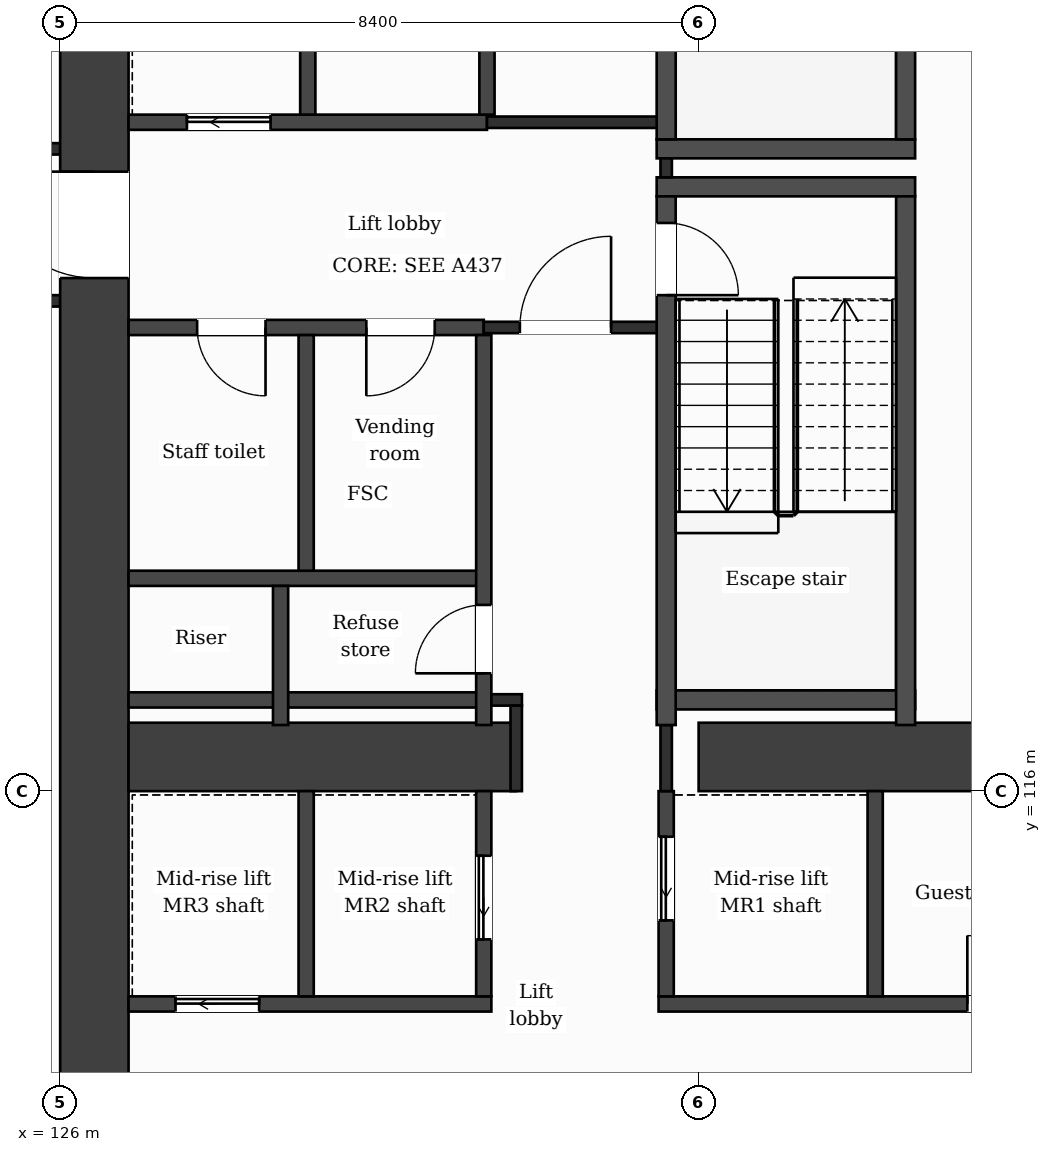
"""IFC4 building model, lengths in metres.
Left out: names, types, materials, properties, quantities, classifications, styles, units other than length and angle.
Written with IfcOpenShell. Run it as: python <this file> out.ifc"""

import sys

from ifc_helpers import new_model, si_unit, direction, frame, frame_2d, origin, place, context, subcontext, project, spatial, rectangle, extrude, element, fill, save


model = new_model("IFC4")
c1 = context("Model", 3, precision=1e-05, world=origin(), true_north=direction((0.0, 1.0)))
c2 = subcontext(c1, "Body", "Model", "MODEL_VIEW")
j1 = project(units=[si_unit("LENGTHUNIT", "METRE"), si_unit("PLANEANGLEUNIT", "RADIAN")], contexts=[c1])
p1 = place(None, origin())
s1 = spatial("IfcSite", under=j1, at=p1, CompositionType="ELEMENT")
p2 = place(p1, origin())
s2 = spatial("IfcBuilding", under=s1, at=p2, CompositionType="ELEMENT")
p3 = place(p2, frame((0.0, 0.0, 155.2)))
s3 = spatial("IfcBuildingStorey", under=s2, at=p3, CompositionType="ELEMENT", Elevation=155.2)
p4 = place(p3, frame((137.776, 131.95, 0.0), z_axis=(0.0, 0.0, 1.0), x_axis=(0.133421759112, -0.991059349482, 0.0)))
e1 = element("IfcWall", 1, at=p4, inside=s3, PredefinedType="SHEAR", context=c2, shape_type="SweptSolid", body=[
    extrude(rectangle(XDim=21.29, YDim=0.9, at=frame_2d((10.645, 0.0))), origin(), (0.0, 0.0, 1.0), 3.7),
])
p5 = place(p3, frame((126.45, 110.85, 0.0), z_axis=(0.0, 0.0, 1.0), x_axis=(0.0, 1.0, 0.0)))
e2 = element("IfcWall", 2, at=p5, inside=s3, PredefinedType="SHEAR", context=c2, shape_type="SweptSolid", body=[
    extrude(rectangle(XDim=21.1, YDim=0.9, at=frame_2d((10.55, 0.0))), origin(), (0.0, 0.0, 1.0), 3.7),
])
p6 = place(p5, frame((11.9, 0.0, 0.0)))
e3 = element("IfcOpeningElement", 3, at=p6, cuts=e2, PredefinedType="OPENING", context=c2, shape_type="SweptSolid", body=[
    extrude(rectangle(XDim=1.4, YDim=2.1, at=frame_2d((0.7, 1.05))), frame((0.0, 0.46, 0.0), z_axis=(0.0, -1.0, 0.0), x_axis=(1.0, 0.0, 0.0)), (0.0, 0.0, 1.0), 0.92),
])
p7 = place(p3, frame((126.9, 116.45, 0.0), z_axis=(0.0, 0.0, 1.0), x_axis=(1.0, 0.0, 0.0)))
e4 = element("IfcWall", 4, at=p7, inside=s3, PredefinedType="SHEAR", context=c2, shape_type="SweptSolid", body=[
    extrude(rectangle(XDim=5.1, YDim=0.9, at=frame_2d((2.55, 0.0))), origin(), (0.0, 0.0, 1.0), 3.7),
])
p8 = place(p3, frame((134.4, 116.45, 0.0), z_axis=(0.0, 0.0, 1.0), x_axis=(1.0, 0.0, 0.0)))
e5 = element("IfcWall", 5, at=p8, inside=s3, PredefinedType="SHEAR", context=c2, shape_type="SweptSolid", body=[
    extrude(rectangle(XDim=5.077, YDim=0.9, at=frame_2d((2.539, 0.0))), origin(), (0.0, 0.0, 1.0), 3.7),
])
p9 = place(p3, frame((126.9, 113.2, 0.0), z_axis=(0.0, 0.0, 1.0), x_axis=(1.0, 0.0, 0.0)))
e6 = element("IfcWall", 6, at=p9, inside=s3, PredefinedType="PARTITIONING", context=c2, shape_type="SweptSolid", body=[
    extrude(rectangle(XDim=4.773, YDim=0.2, at=frame_2d((2.387, 0.0))), origin(), (0.0, 0.0, 1.0), 3.38),
])
p10 = place(p9, frame((0.618, 0.0, 0.0)))
e7 = element("IfcOpeningElement", 7, at=p10, cuts=e6, PredefinedType="OPENING", context=c2, shape_type="SweptSolid", body=[
    extrude(rectangle(XDim=1.1, YDim=2.1, at=frame_2d((0.55, 1.05))), frame((0.0, 0.11, 0.0), z_axis=(0.0, -1.0, 0.0), x_axis=(1.0, 0.0, 0.0)), (0.0, 0.0, 1.0), 0.22),
])
p11 = place(p3, frame((133.873, 113.2, 0.0), z_axis=(0.0, 0.0, 1.0), x_axis=(1.0, 0.0, 0.0)))
e8 = element("IfcWall", 8, at=p11, inside=s3, PredefinedType="PARTITIONING", context=c2, shape_type="SweptSolid", body=[
    extrude(rectangle(XDim=6.003, YDim=0.2, at=frame_2d((3.001, 0.0))), origin(), (0.0, 0.0, 1.0), 3.38),
])
p12 = place(p11, frame((4.062, 0.0, 0.0)))
e9 = element("IfcOpeningElement", 9, at=p12, cuts=e8, PredefinedType="OPENING", context=c2, shape_type="SweptSolid", body=[
    extrude(rectangle(XDim=0.9, YDim=2.1, at=frame_2d((0.45, 1.05))), frame((0.0, 0.11, 0.0), z_axis=(0.0, -1.0, 0.0), x_axis=(1.0, 0.0, 0.0)), (0.0, 0.0, 1.0), 0.22),
])
p13 = place(p3, frame((126.9, 117.2, 0.0), z_axis=(0.0, 0.0, 1.0), x_axis=(1.0, 0.0, 0.0)))
e10 = element("IfcWall", 10, at=p13, inside=s3, PredefinedType="PARTITIONING", context=c2, shape_type="SweptSolid", body=[
    extrude(rectangle(XDim=4.673, YDim=0.2, at=frame_2d((2.336, 0.0))), origin(), (0.0, 0.0, 1.0), 3.38),
])
p14 = place(p3, frame((131.573, 117.2, 0.0), z_axis=(0.0, 0.0, 1.0), x_axis=(1.0, 0.0, 0.0)))
e11 = element("IfcWall", 11, at=p14, inside=s3, PredefinedType="PARTITIONING", context=c2, shape_type="SweptSolid", body=[
    extrude(rectangle(XDim=0.502, YDim=0.15, at=frame_2d((0.251, 0.0))), origin(), (0.0, 0.0, 1.0), 3.38),
])
p15 = place(p3, frame((133.848, 117.2, 0.0), z_axis=(0.0, 0.0, 1.0), x_axis=(1.0, 0.0, 0.0)))
e12 = element("IfcWall", 12, at=p15, inside=s3, PredefinedType="PARTITIONING", context=c2, shape_type="SweptSolid", body=[
    extrude(rectangle(XDim=3.4, YDim=0.25, at=frame_2d((1.7, 0.0))), origin(), (0.0, 0.0, 1.0), 3.38),
])
p16 = place(p3, frame((126.9, 118.8, 0.0), z_axis=(0.0, 0.0, 1.0), x_axis=(1.0, 0.0, 0.0)))
e13 = element("IfcWall", 13, at=p16, inside=s3, PredefinedType="PARTITIONING", context=c2, shape_type="SweptSolid", body=[
    extrude(rectangle(XDim=4.673, YDim=0.2, at=frame_2d((2.336, 0.0))), origin(), (0.0, 0.0, 1.0), 3.38),
])
p17 = place(p3, frame((126.9, 122.1, 0.0), z_axis=(0.0, 0.0, 1.0), x_axis=(1.0, 0.0, 0.0)))
e14 = element("IfcWall", 14, at=p17, inside=s3, PredefinedType="PARTITIONING", context=c2, shape_type="SweptSolid", body=[
    extrude(rectangle(XDim=4.673, YDim=0.2, at=frame_2d((2.336, 0.0))), origin(), (0.0, 0.0, 1.0), 3.38),
])
p18 = place(p17, frame((3.128, 0.0, 0.0)))
e15 = element("IfcOpeningElement", 15, at=p18, cuts=e14, PredefinedType="OPENING", context=c2, shape_type="SweptSolid", body=[
    extrude(rectangle(XDim=0.9, YDim=2.1, at=frame_2d((0.45, 1.05))), frame((0.0, 0.11, 0.0), z_axis=(0.0, -1.0, 0.0), x_axis=(1.0, 0.0, 0.0)), (0.0, 0.0, 1.0), 0.22),
])
p19 = place(p17, frame((0.902, 0.0, 0.0)))
e16 = element("IfcOpeningElement", 16, at=p19, cuts=e14, PredefinedType="OPENING", context=c2, shape_type="SweptSolid", body=[
    extrude(rectangle(XDim=0.9, YDim=2.1, at=frame_2d((0.45, 1.05))), frame((0.0, 0.11, 0.0), z_axis=(0.0, -1.0, 0.0), x_axis=(1.0, 0.0, 0.0)), (0.0, 0.0, 1.0), 0.22),
])
p20 = place(p3, frame((131.573, 122.1, 0.0), z_axis=(0.0, 0.0, 1.0), x_axis=(1.0, 0.0, 0.0)))
e17 = element("IfcWall", 17, at=p20, inside=s3, PredefinedType="PARTITIONING", context=c2, shape_type="SweptSolid", body=[
    extrude(rectangle(XDim=2.4, YDim=0.15, at=frame_2d((1.2, 0.0))), origin(), (0.0, 0.0, 1.0), 3.38),
])
p21 = place(p20, frame((0.475, 0.0, 0.0)))
e18 = element("IfcOpeningElement", 18, at=p21, cuts=e17, PredefinedType="OPENING", context=c2, shape_type="SweptSolid", body=[
    extrude(rectangle(XDim=1.2, YDim=2.1, at=frame_2d((0.6, 1.05))), frame((0.0, 0.085, 0.0), z_axis=(0.0, -1.0, 0.0), x_axis=(1.0, 0.0, 0.0)), (0.0, 0.0, 1.0), 0.17),
])
p22 = place(p3, frame((100.8, 122.45, 0.0), z_axis=(0.0, 0.0, 1.0), x_axis=(1.0, 0.0, 0.0)))
e19 = element("IfcWall", 19, at=p22, inside=s3, PredefinedType="PARTITIONING", context=c2, shape_type="SweptSolid", body=[
    extrude(rectangle(XDim=25.2, YDim=0.15, at=frame_2d((12.6, 0.0))), origin(), (0.0, 0.0, 1.0), 3.38),
])
for number, where, z_axis, x_axis in (
    (20, (133.848, 123.95, 0.0), (0.0, 0.0, 1.0), (1.0, 0.0, 0.0)),
    (21, (133.848, 124.45, 0.0), (0.0, 0.0, 1.0), (1.0, 0.0, 0.0)),
):
    element("IfcWall", number, at=place(p3, frame(where, z_axis=z_axis, x_axis=x_axis)), inside=s3, PredefinedType="PARTITIONING", context=c2, shape_type="SweptSolid", body=[
        extrude(rectangle(XDim=3.4, YDim=0.25, at=frame_2d((1.7, 0.0))), origin(), (0.0, 0.0, 1.0), 3.38),
    ])
p23 = place(p3, frame((100.8, 124.45, 0.0), z_axis=(0.0, 0.0, 1.0), x_axis=(1.0, 0.0, 0.0)))
e22 = element("IfcWall", 22, at=p23, inside=s3, PredefinedType="PARTITIONING", context=c2, shape_type="SweptSolid", body=[
    extrude(rectangle(XDim=25.2, YDim=0.15, at=frame_2d((12.6, 0.0))), origin(), (0.0, 0.0, 1.0), 3.38),
])
p24 = place(p23, frame((3.03, 0.0, 0.0)))
e23 = element("IfcOpeningElement", 23, at=p24, cuts=e22, PredefinedType="OPENING", context=c2, shape_type="SweptSolid", body=[
    extrude(rectangle(XDim=1.0, YDim=2.1, at=frame_2d((0.5, 1.05))), frame((0.0, 0.085, 0.0), z_axis=(0.0, -1.0, 0.0), x_axis=(1.0, 0.0, 0.0)), (0.0, 0.0, 1.0), 0.17),
])
p25 = place(p23, frame((12.77, 0.0, 0.0)))
e24 = element("IfcOpeningElement", 24, at=p25, cuts=e22, PredefinedType="OPENING", context=c2, shape_type="SweptSolid", body=[
    extrude(rectangle(XDim=1.0, YDim=2.1, at=frame_2d((0.5, 1.05))), frame((0.0, 0.085, 0.0), z_axis=(0.0, -1.0, 0.0), x_axis=(1.0, 0.0, 0.0)), (0.0, 0.0, 1.0), 0.17),
])
p26 = place(p23, frame((17.67, 0.0, 0.0)))
e25 = element("IfcOpeningElement", 25, at=p26, cuts=e22, PredefinedType="OPENING", context=c2, shape_type="SweptSolid", body=[
    extrude(rectangle(XDim=1.0, YDim=2.1, at=frame_2d((0.5, 1.05))), frame((0.0, 0.085, 0.0), z_axis=(0.0, -1.0, 0.0), x_axis=(1.0, 0.0, 0.0)), (0.0, 0.0, 1.0), 0.17),
])
p27 = place(p23, frame((22.35, 0.0, 0.0)))
e26 = element("IfcOpeningElement", 26, at=p27, cuts=e22, PredefinedType="OPENING", context=c2, shape_type="SweptSolid", body=[
    extrude(rectangle(XDim=1.0, YDim=2.1, at=frame_2d((0.5, 1.05))), frame((0.0, 0.085, 0.0), z_axis=(0.0, -1.0, 0.0), x_axis=(1.0, 0.0, 0.0)), (0.0, 0.0, 1.0), 0.17),
])
p28 = place(p3, frame((126.9, 124.8, 0.0), z_axis=(0.0, 0.0, 1.0), x_axis=(1.0, 0.0, 0.0)))
e27 = element("IfcWall", 27, at=p28, inside=s3, PredefinedType="PARTITIONING", context=c2, shape_type="SweptSolid", body=[
    extrude(rectangle(XDim=4.715, YDim=0.2, at=frame_2d((2.358, 0.0))), origin(), (0.0, 0.0, 1.0), 3.38),
])
p29 = place(p28, frame((0.768, 0.0, 0.0)))
e28 = element("IfcOpeningElement", 28, at=p29, cuts=e27, PredefinedType="OPENING", context=c2, shape_type="SweptSolid", body=[
    extrude(rectangle(XDim=1.1, YDim=2.1, at=frame_2d((0.55, 1.05))), frame((0.0, 0.11, 0.0), z_axis=(0.0, -1.0, 0.0), x_axis=(1.0, 0.0, 0.0)), (0.0, 0.0, 1.0), 0.22),
])
p30 = place(p3, frame((131.615, 124.8, 0.0), z_axis=(0.0, 0.0, 1.0), x_axis=(1.0, 0.0, 0.0)))
e29 = element("IfcWall", 29, at=p30, inside=s3, PredefinedType="PARTITIONING", context=c2, shape_type="SweptSolid", body=[
    extrude(rectangle(XDim=2.483, YDim=0.15, at=frame_2d((1.241, 0.0))), origin(), (0.0, 0.0, 1.0), 3.38),
])
p31 = place(p3, frame((128.9, 116.87, 0.0), z_axis=(0.0, 0.0, 1.0), x_axis=(0.0, 1.0, 0.0)))
e30 = element("IfcWall", 30, at=p31, inside=s3, PredefinedType="PARTITIONING", context=c2, shape_type="SweptSolid", body=[
    extrude(rectangle(XDim=1.83, YDim=0.2, at=frame_2d((0.915, 0.0))), origin(), (0.0, 0.0, 1.0), 3.38),
])
p32 = place(p3, frame((129.237, 113.3, 0.0), z_axis=(0.0, 0.0, 1.0), x_axis=(0.0, 1.0, 0.0)))
e31 = element("IfcWall", 31, at=p32, inside=s3, PredefinedType="PARTITIONING", context=c2, shape_type="SweptSolid", body=[
    extrude(rectangle(XDim=2.7, YDim=0.2, at=frame_2d((1.35, 0.0))), origin(), (0.0, 0.0, 1.0), 3.38),
])
for number, where, z_axis, x_axis in (
    (32, (129.237, 118.9, 0.0), (0.0, 0.0, 1.0), (0.0, 1.0, 0.0)),
    (33, (129.258, 124.9, 0.0), (0.0, 0.0, 1.0), (0.0, 1.0, 0.0)),
):
    element("IfcWall", number, at=place(p3, frame(where, z_axis=z_axis, x_axis=x_axis)), inside=s3, PredefinedType="PARTITIONING", context=c2, shape_type="SweptSolid", body=[
        extrude(rectangle(XDim=3.1, YDim=0.2, at=frame_2d((1.55, 0.0))), origin(), (0.0, 0.0, 1.0), 3.38),
    ])
p33 = place(p3, frame((131.573, 113.3, 0.0), z_axis=(0.0, 0.0, 1.0), x_axis=(0.0, 1.0, 0.0)))
e34 = element("IfcWall", 34, at=p33, inside=s3, PredefinedType="PARTITIONING", context=c2, shape_type="SweptSolid", body=[
    extrude(rectangle(XDim=2.7, YDim=0.2, at=frame_2d((1.35, 0.0))), origin(), (0.0, 0.0, 1.0), 3.38),
])
p34 = place(p33, frame((0.75, 0.0, 0.0)))
e35 = element("IfcOpeningElement", 35, at=p34, cuts=e34, PredefinedType="OPENING", context=c2, shape_type="SweptSolid", body=[
    extrude(rectangle(XDim=1.1, YDim=2.1, at=frame_2d((0.55, 1.05))), frame((0.0, 0.11, 0.0), z_axis=(0.0, -1.0, 0.0), x_axis=(1.0, 0.0, 0.0)), (0.0, 0.0, 1.0), 0.22),
])
p35 = place(p3, frame((131.573, 116.87, 0.0), z_axis=(0.0, 0.0, 1.0), x_axis=(0.0, 1.0, 0.0)))
e36 = element("IfcWall", 36, at=p35, inside=s3, PredefinedType="PARTITIONING", context=c2, shape_type="SweptSolid", body=[
    extrude(rectangle(XDim=5.13, YDim=0.2, at=frame_2d((2.565, 0.0))), origin(), (0.0, 0.0, 1.0), 3.38),
])
p36 = place(p35, frame((0.68, 0.0, 0.0)))
e37 = element("IfcOpeningElement", 37, at=p36, cuts=e36, PredefinedType="OPENING", context=c2, shape_type="SweptSolid", body=[
    extrude(rectangle(XDim=0.9, YDim=2.1, at=frame_2d((0.45, 1.05))), frame((0.0, 0.11, 0.0), z_axis=(0.0, -1.0, 0.0), x_axis=(1.0, 0.0, 0.0)), (0.0, 0.0, 1.0), 0.22),
])
p37 = place(p3, frame((131.615, 124.9, 0.0), z_axis=(0.0, 0.0, 1.0), x_axis=(0.0, 1.0, 0.0)))
e38 = element("IfcWall", 38, at=p37, inside=s3, PredefinedType="PARTITIONING", context=c2, shape_type="SweptSolid", body=[
    extrude(rectangle(XDim=3.1, YDim=0.2, at=frame_2d((1.55, 0.0))), origin(), (0.0, 0.0, 1.0), 3.38),
])
p38 = place(p3, frame((132.0, 116.0, 0.0), z_axis=(0.0, 0.0, 1.0), x_axis=(0.0, 1.0, 0.0)))
e39 = element("IfcWall", 39, at=p38, inside=s3, PredefinedType="PARTITIONING", context=c2, shape_type="SweptSolid", body=[
    extrude(rectangle(XDim=1.125, YDim=0.15, at=frame_2d((0.562, 0.0))), origin(), (0.0, 0.0, 1.0), 3.38),
])
p39 = place(p3, frame((133.973, 113.3, 0.0), z_axis=(0.0, 0.0, 1.0), x_axis=(0.0, 1.0, 0.0)))
e40 = element("IfcWall", 40, at=p39, inside=s3, PredefinedType="PARTITIONING", context=c2, shape_type="SweptSolid", body=[
    extrude(rectangle(XDim=2.7, YDim=0.2, at=frame_2d((1.35, 0.0))), origin(), (0.0, 0.0, 1.0), 3.38),
])
p40 = place(p39, frame((1.0, 0.0, 0.0)))
e41 = element("IfcOpeningElement", 41, at=p40, cuts=e40, PredefinedType="OPENING", context=c2, shape_type="SweptSolid", body=[
    extrude(rectangle(XDim=1.1, YDim=2.1, at=frame_2d((0.55, 1.05))), frame((0.0, 0.11, 0.0), z_axis=(0.0, -1.0, 0.0), x_axis=(1.0, 0.0, 0.0)), (0.0, 0.0, 1.0), 0.22),
])
p41 = place(p3, frame((133.973, 116.0, 0.0), z_axis=(0.0, 0.0, 1.0), x_axis=(0.0, 1.0, 0.0)))
e42 = element("IfcWall", 42, at=p41, inside=s3, PredefinedType="PARTITIONING", context=c2, shape_type="SweptSolid", body=[
    extrude(rectangle(XDim=0.87, YDim=0.15, at=frame_2d((0.435, 0.0))), origin(), (0.0, 0.0, 1.0), 3.38),
])
p42 = place(p3, frame((133.973, 124.075, 0.0), z_axis=(0.0, 0.0, 1.0), x_axis=(0.0, 1.0, 0.0)))
e43 = element("IfcWall", 43, at=p42, inside=s3, PredefinedType="PARTITIONING", context=c2, shape_type="SweptSolid", body=[
    extrude(rectangle(XDim=0.25, YDim=0.15, at=frame_2d((0.125, 0.0))), origin(), (0.0, 0.0, 1.0), 3.38),
])
p43 = place(p3, frame((133.973, 116.87, 0.0), z_axis=(0.0, 0.0, 1.0), x_axis=(0.0, 1.0, 0.0)))
e44 = element("IfcWall", 44, at=p43, inside=s3, PredefinedType="PARTITIONING", context=c2, shape_type="SweptSolid", body=[
    extrude(rectangle(XDim=6.955, YDim=0.25, at=frame_2d((3.478, 0.0))), origin(), (0.0, 0.0, 1.0), 3.38),
])
p44 = place(p43, frame((5.655, 0.0, 0.0)))
e45 = element("IfcOpeningElement", 45, at=p44, cuts=e44, PredefinedType="OPENING", context=c2, shape_type="SweptSolid", body=[
    extrude(rectangle(XDim=0.95, YDim=2.1, at=frame_2d((0.475, 1.05))), frame((0.0, 0.135, 0.0), z_axis=(0.0, -1.0, 0.0), x_axis=(1.0, 0.0, 0.0)), (0.0, 0.0, 1.0), 0.27),
])
p45 = place(p3, frame((133.973, 124.575, 0.0), z_axis=(0.0, 0.0, 1.0), x_axis=(0.0, 1.0, 0.0)))
e46 = element("IfcWall", 46, at=p45, inside=s3, PredefinedType="PARTITIONING", context=c2, shape_type="SweptSolid", body=[
    extrude(rectangle(XDim=6.955, YDim=0.25, at=frame_2d((3.478, 0.0))), origin(), (0.0, 0.0, 1.0), 3.38),
])
p46 = place(p45, frame((5.325, 0.0, 0.0)))
e47 = element("IfcOpeningElement", 47, at=p46, cuts=e46, PredefinedType="OPENING", context=c2, shape_type="SweptSolid", body=[
    extrude(rectangle(XDim=1.0, YDim=2.1, at=frame_2d((0.5, 1.05))), frame((0.0, 0.135, 0.0), z_axis=(0.0, -1.0, 0.0), x_axis=(1.0, 0.0, 0.0)), (0.0, 0.0, 1.0), 0.27),
])
p47 = place(p3, frame((136.722, 113.3, 0.0), z_axis=(0.0, 0.0, 1.0), x_axis=(0.0, 1.0, 0.0)))
e48 = element("IfcWall", 48, at=p47, inside=s3, PredefinedType="PARTITIONING", context=c2, shape_type="SweptSolid", body=[
    extrude(rectangle(XDim=2.7, YDim=0.2, at=frame_2d((1.35, 0.0))), origin(), (0.0, 0.0, 1.0), 3.38),
])
p48 = place(p3, frame((137.123, 116.87, 0.0), z_axis=(0.0, 0.0, 1.0), x_axis=(0.0, 1.0, 0.0)))
e49 = element("IfcWall", 49, at=p48, inside=s3, PredefinedType="PARTITIONING", context=c2, shape_type="SweptSolid", body=[
    extrude(rectangle(XDim=6.955, YDim=0.25, at=frame_2d((3.478, 0.0))), origin(), (0.0, 0.0, 1.0), 3.38),
])
p49 = place(p3, frame((137.123, 124.575, 0.0), z_axis=(0.0, 0.0, 1.0), x_axis=(0.0, 1.0, 0.0)))
e50 = element("IfcWall", 50, at=p49, inside=s3, PredefinedType="PARTITIONING", context=c2, shape_type="SweptSolid", body=[
    extrude(rectangle(XDim=6.955, YDim=0.25, at=frame_2d((3.478, 0.0))), origin(), (0.0, 0.0, 1.0), 3.38),
])
p50 = place(p21, origin())
e51 = element("IfcDoor", 51, at=p50, inside=s3, OperationType="SINGLE_SWING_RIGHT", PredefinedType="DOOR", context=c2, shape_type="SweptSolid", body=[
    extrude(rectangle(XDim=1.2, YDim=2.1, at=frame_2d((0.6, 1.05))), frame((0.0, 0.025, 0.0), z_axis=(0.0, -1.0, 0.0), x_axis=(1.0, 0.0, 0.0)), (0.0, 0.0, 1.0), 0.05),
])
fill(e18, e51)
p51 = place(p29, origin())
e52 = element("IfcDoor", 52, at=p51, inside=s3, OperationType="SLIDING_TO_LEFT", PredefinedType="DOOR", context=c2, shape_type="SweptSolid", body=[
    extrude(rectangle(XDim=1.1, YDim=2.1, at=frame_2d((0.55, 1.05))), frame((0.0, 0.025, 0.0), z_axis=(0.0, -1.0, 0.0), x_axis=(1.0, 0.0, 0.0)), (0.0, 0.0, 1.0), 0.05),
])
fill(e28, e52)
p52 = place(p18, origin())
e53 = element("IfcDoor", 53, at=p52, inside=s3, OperationType="SINGLE_SWING_LEFT", PredefinedType="DOOR", context=c2, shape_type="SweptSolid", body=[
    extrude(rectangle(XDim=0.9, YDim=2.1, at=frame_2d((0.45, 1.05))), frame((0.0, 0.025, 0.0), z_axis=(0.0, -1.0, 0.0), x_axis=(1.0, 0.0, 0.0)), (0.0, 0.0, 1.0), 0.05),
])
fill(e15, e53)
p53 = place(p19, origin())
e54 = element("IfcDoor", 54, at=p53, inside=s3, OperationType="SINGLE_SWING_RIGHT", PredefinedType="DOOR", context=c2, shape_type="SweptSolid", body=[
    extrude(rectangle(XDim=0.9, YDim=2.1, at=frame_2d((0.45, 1.05))), frame((0.0, 0.025, 0.0), z_axis=(0.0, -1.0, 0.0), x_axis=(1.0, 0.0, 0.0)), (0.0, 0.0, 1.0), 0.05),
])
fill(e16, e54)
p54 = place(p44, origin())
e55 = element("IfcDoor", 55, at=p54, inside=s3, OperationType="SINGLE_SWING_LEFT", PredefinedType="DOOR", context=c2, shape_type="SweptSolid", body=[
    extrude(rectangle(XDim=0.95, YDim=2.1, at=frame_2d((0.475, 1.05))), frame((0.0, 0.025, 0.0), z_axis=(0.0, -1.0, 0.0), x_axis=(1.0, 0.0, 0.0)), (0.0, 0.0, 1.0), 0.05),
])
fill(e45, e55)
p55 = place(p36, origin())
e56 = element("IfcDoor", 56, at=p55, inside=s3, OperationType="SINGLE_SWING_LEFT", PredefinedType="DOOR", context=c2, shape_type="SweptSolid", body=[
    extrude(rectangle(XDim=0.9, YDim=2.1, at=frame_2d((0.45, 1.05))), frame((0.0, 0.025, 0.0), z_axis=(0.0, -1.0, 0.0), x_axis=(1.0, 0.0, 0.0)), (0.0, 0.0, 1.0), 0.05),
])
fill(e37, e56)
p56 = place(p40, origin())
e57 = element("IfcDoor", 57, at=p56, inside=s3, OperationType="SLIDING_TO_LEFT", PredefinedType="DOOR", context=c2, shape_type="SweptSolid", body=[
    extrude(rectangle(XDim=1.1, YDim=2.1, at=frame_2d((0.55, 1.05))), frame((0.0, 0.025, 0.0), z_axis=(0.0, -1.0, 0.0), x_axis=(1.0, 0.0, 0.0)), (0.0, 0.0, 1.0), 0.05),
])
fill(e41, e57)
p57 = place(p34, origin())
e58 = element("IfcDoor", 58, at=p57, inside=s3, OperationType="SLIDING_TO_LEFT", PredefinedType="DOOR", context=c2, shape_type="SweptSolid", body=[
    extrude(rectangle(XDim=1.1, YDim=2.1, at=frame_2d((0.55, 1.05))), frame((0.0, 0.025, 0.0), z_axis=(0.0, -1.0, 0.0), x_axis=(1.0, 0.0, 0.0)), (0.0, 0.0, 1.0), 0.05),
])
fill(e35, e58)
p58 = place(p10, origin())
e59 = element("IfcDoor", 59, at=p58, inside=s3, OperationType="SLIDING_TO_LEFT", PredefinedType="DOOR", context=c2, shape_type="SweptSolid", body=[
    extrude(rectangle(XDim=1.1, YDim=2.1, at=frame_2d((0.55, 1.05))), frame((0.0, 0.025, 0.0), z_axis=(0.0, -1.0, 0.0), x_axis=(1.0, 0.0, 0.0)), (0.0, 0.0, 1.0), 0.05),
])
fill(e7, e59)
p59 = place(p12, origin())
e60 = element("IfcDoor", 60, at=p59, inside=s3, OperationType="SINGLE_SWING_LEFT", PredefinedType="DOOR", context=c2, shape_type="SweptSolid", body=[
    extrude(rectangle(XDim=0.9, YDim=2.1, at=frame_2d((0.45, 1.05))), frame((0.0, 0.025, 0.0), z_axis=(0.0, -1.0, 0.0), x_axis=(1.0, 0.0, 0.0)), (0.0, 0.0, 1.0), 0.05),
])
fill(e9, e60)
p60 = place(p6, origin())
e61 = element("IfcDoor", 61, at=p60, inside=s3, OperationType="SINGLE_SWING_RIGHT", PredefinedType="DOOR", context=c2, shape_type="SweptSolid", body=[
    extrude(rectangle(XDim=1.4, YDim=2.1, at=frame_2d((0.7, 1.05))), frame((0.0, 0.025, 0.0), z_axis=(0.0, -1.0, 0.0), x_axis=(1.0, 0.0, 0.0)), (0.0, 0.0, 1.0), 0.05),
])
fill(e3, e61)
save(model, sys.argv[1])
